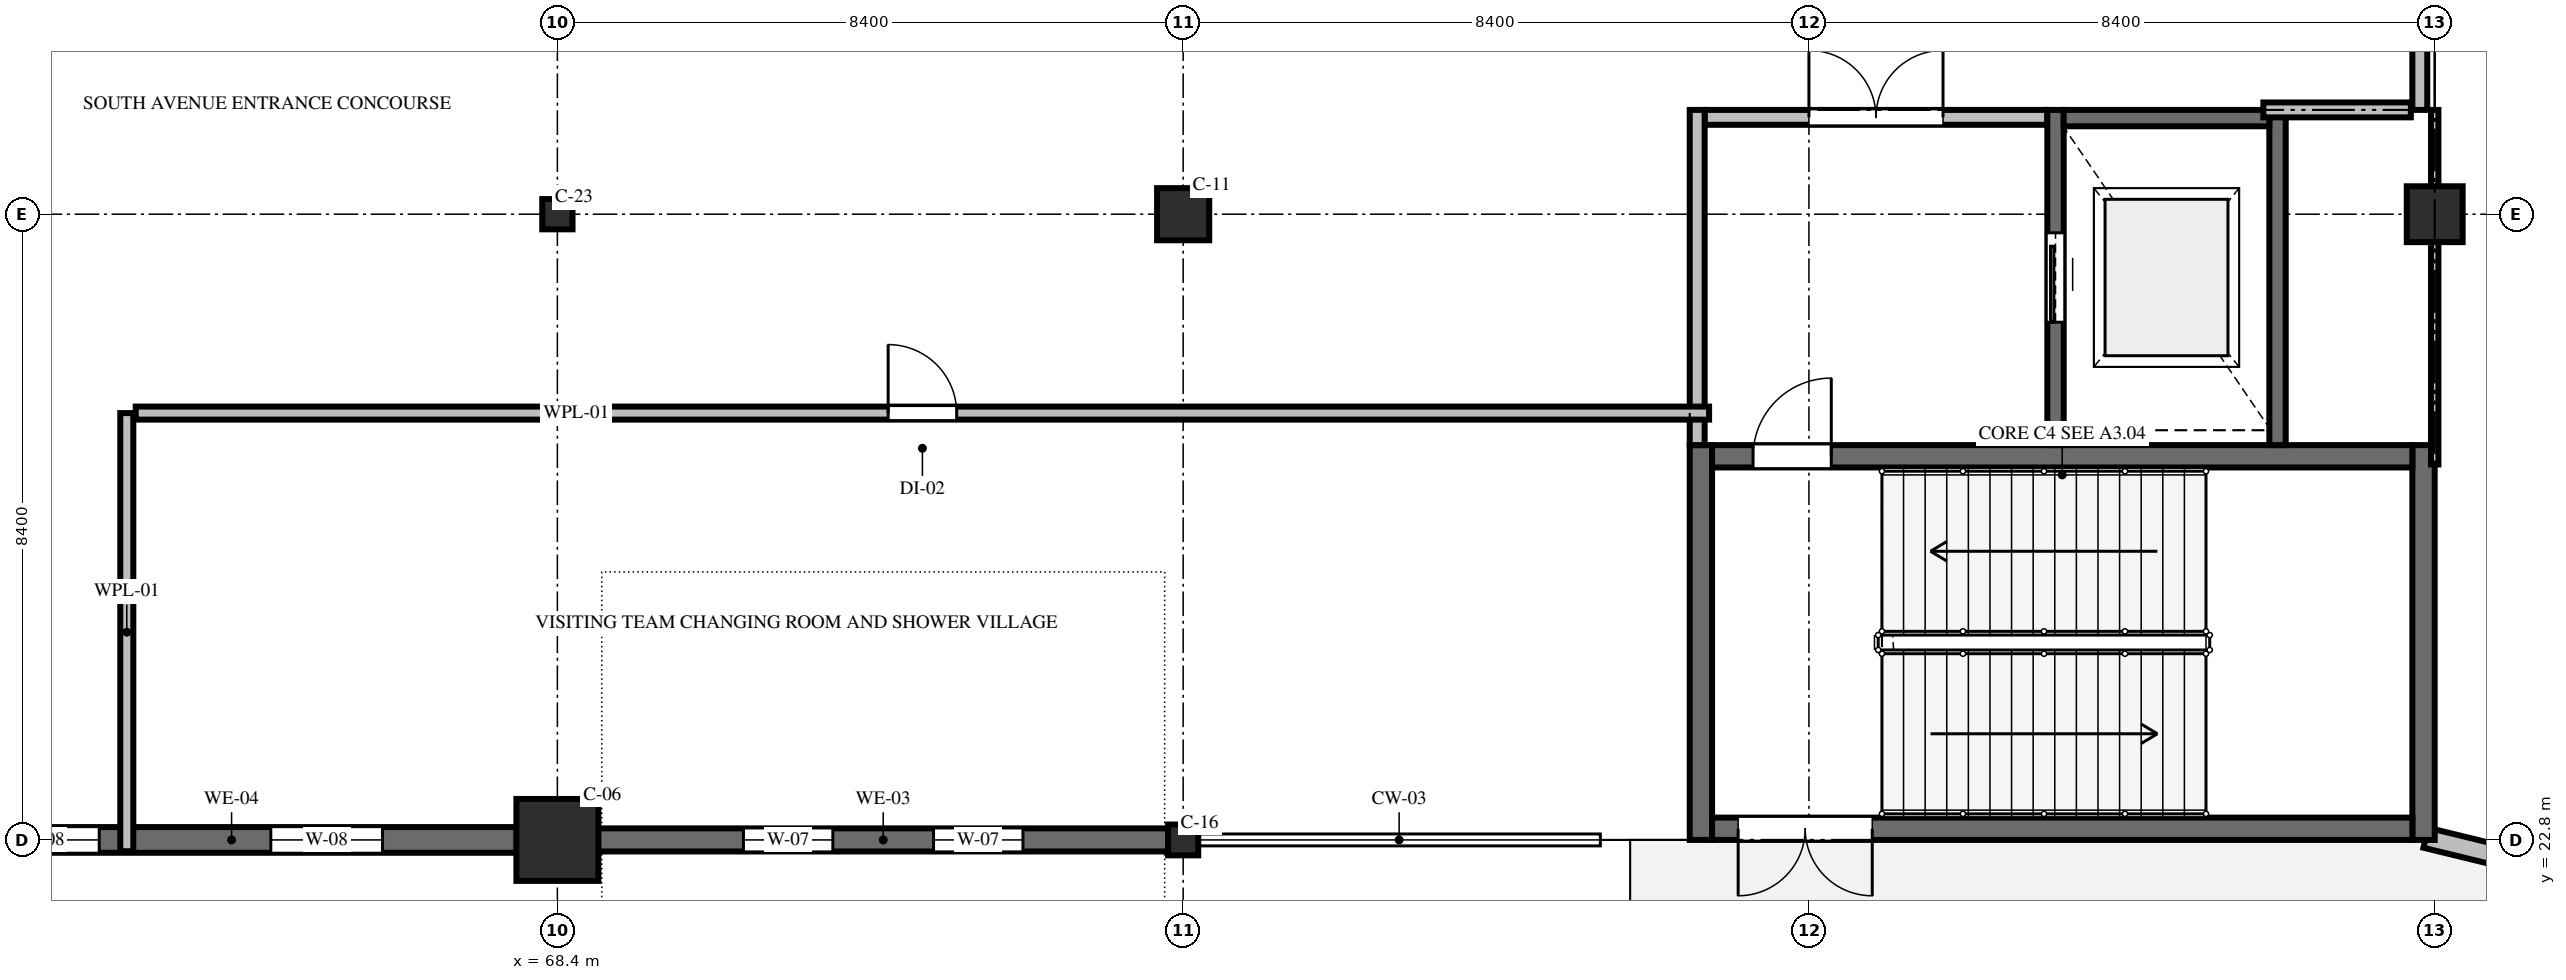
"""IFC4 building model, lengths in metres.
Left out: names, types, materials, properties, quantities, classifications, styles, units other than length and angle.
Written with IfcOpenShell. Run it as: python <this file> out.ifc"""

import sys

from ifc_helpers import new_model, si_unit, direction, frame, frame_2d, origin, origin_2d, place, context, subcontext, project, spatial, rectangle, circle, hollow_circle, i_section, extrude, element, fill, save


model = new_model("IFC4")
c1 = context("Model", 3, precision=1e-05, world=origin(), true_north=direction((0.0, 1.0)))
c2 = subcontext(c1, "Body", "Model", "MODEL_VIEW")
j1 = project(units=[si_unit("LENGTHUNIT", "METRE"), si_unit("PLANEANGLEUNIT", "RADIAN")], contexts=[c1])
p1 = place(None, origin())
s1 = spatial("IfcSite", under=j1, at=p1, CompositionType="ELEMENT")
p2 = place(p1, origin())
s2 = spatial("IfcBuilding", under=s1, at=p2, CompositionType="ELEMENT")
p3 = place(p2, origin())
s3 = spatial("IfcBuildingStorey", under=s2, at=p3, CompositionType="ELEMENT", Elevation=0.0)
p4 = place(p3, frame((68.4, 22.8, 0.0), z_axis=(0.0, 0.0, 1.0), x_axis=(1.0, 0.0, 0.0)))
e1 = element("IfcColumn", 1, at=p4, inside=s3, PredefinedType="COLUMN", context=c2, shape_type="SweptSolid", body=[
    extrude(rectangle(XDim=1.1, YDim=1.1, at=origin_2d()), origin(), (0.0, 0.0, 1.0), 5.4),
])
p5 = place(p3, frame((68.4, 31.2, 0.0), z_axis=(0.0, 0.0, 1.0), x_axis=(1.0, 0.0, 0.0)))
e2 = element("IfcColumn", 2, at=p5, inside=s3, PredefinedType="COLUMN", context=c2, shape_type="SweptSolid", body=[
    extrude(hollow_circle(Radius=0.203, WallThickness=0.016, at=origin_2d()), origin(), (0.0, 0.0, 1.0), 5.4),
])
p6 = place(p3, frame((76.8, 22.8, 0.0), z_axis=(0.0, 0.0, 1.0), x_axis=(1.0, 0.0, 0.0)))
e3 = element("IfcColumn", 3, at=p6, inside=s3, PredefinedType="COLUMN", context=c2, shape_type="SweptSolid", body=[
    extrude(i_section(OverallWidth=0.405, OverallDepth=0.414, WebThickness=0.018, FlangeThickness=0.028, FilletRadius=0.022, at=origin_2d()), origin(), (0.0, 0.0, 1.0), 5.4),
])
p7 = place(p3, frame((76.8, 31.2, 0.0), z_axis=(0.0, 0.0, 1.0), x_axis=(1.0, 0.0, 0.0)))
e4 = element("IfcColumn", 4, at=p7, inside=s3, PredefinedType="COLUMN", context=c2, shape_type="SweptSolid", body=[
    extrude(circle(Radius=0.35, at=origin_2d()), origin(), (0.0, 0.0, 1.0), 5.4),
])
p8 = place(p3, frame((93.6, 31.2, 0.0), z_axis=(0.0, 0.0, 1.0), x_axis=(1.0, 0.0, 0.0)))
e5 = element("IfcColumn", 5, at=p8, inside=s3, PredefinedType="COLUMN", context=c2, shape_type="SweptSolid", body=[
    extrude(rectangle(XDim=0.75, YDim=0.75, at=origin_2d()), origin(), (0.0, 0.0, 1.0), 5.4),
])
p9 = place(p3, frame((99.195, 21.435, 0.0), z_axis=(0.0, 0.0, 1.0), x_axis=(-0.971518473988, 0.236963825721, 0.0)))
e6 = element("IfcWall", 6, at=p9, inside=s3, PredefinedType="SOLIDWALL", context=c2, shape_type="SweptSolid", body=[
    extrude(rectangle(XDim=5.881, YDim=0.275, at=frame_2d((2.94, 0.0))), origin(), (0.0, 0.0, 1.0), 5.1),
])
p10 = place(p9, frame((2.465, 0.0, 0.0)))
e7 = element("IfcOpeningElement", 7, at=p10, cuts=e6, PredefinedType="OPENING", context=c2, shape_type="SweptSolid", body=[
    extrude(rectangle(XDim=0.95, YDim=2.15, at=frame_2d((0.475, 1.075))), frame((0.0, 0.147, 0.0), z_axis=(0.0, -1.0, 0.0), x_axis=(1.0, 0.0, 0.0)), (0.0, 0.0, 1.0), 0.295),
])
p11 = place(p3, frame((76.602, 22.8, 0.0), z_axis=(0.0, 0.0, 1.0), x_axis=(-1.0, 0.0, 0.0)))
e8 = element("IfcWall", 8, at=p11, inside=s3, PredefinedType="SOLIDWALL", context=c2, shape_type="SweptSolid", body=[
    extrude(rectangle(XDim=7.656, YDim=0.31, at=frame_2d((3.828, 0.0))), origin(), (0.0, 0.0, 1.0), 3.063),
])
p12 = place(p11, frame((1.952, 0.0, 0.9)))
e9 = element("IfcOpeningElement", 9, at=p12, cuts=e8, PredefinedType="OPENING", context=c2, shape_type="SweptSolid", body=[
    extrude(rectangle(XDim=1.2, YDim=1.5, at=frame_2d((0.6, 0.75))), frame((0.0, 0.165, 0.0), z_axis=(0.0, -1.0, 0.0), x_axis=(1.0, 0.0, 0.0)), (0.0, 0.0, 1.0), 0.33),
])
p13 = place(p11, frame((4.504, 0.0, 0.9)))
e10 = element("IfcOpeningElement", 10, at=p13, cuts=e8, PredefinedType="OPENING", context=c2, shape_type="SweptSolid", body=[
    extrude(rectangle(XDim=1.2, YDim=1.5, at=frame_2d((0.6, 0.75))), frame((0.0, 0.165, 0.0), z_axis=(0.0, -1.0, 0.0), x_axis=(1.0, 0.0, 0.0)), (0.0, 0.0, 1.0), 0.33),
])
p14 = place(p3, frame((67.854, 22.8, 0.0), z_axis=(0.0, 0.0, 1.0), x_axis=(-1.0, 0.0, 0.0)))
e11 = element("IfcWall", 11, at=p14, inside=s3, PredefinedType="SOLIDWALL", context=c2, shape_type="SweptSolid", body=[
    extrude(rectangle(XDim=7.655, YDim=0.345, at=frame_2d((3.827, 0.0))), origin(), (0.0, 0.0, 1.0), 3.063),
])
p15 = place(p14, frame((1.801, 0.0, 0.9)))
e12 = element("IfcOpeningElement", 12, at=p15, cuts=e11, PredefinedType="OPENING", context=c2, shape_type="SweptSolid", body=[
    extrude(rectangle(XDim=1.5, YDim=1.5, at=frame_2d((0.75, 0.75))), frame((0.0, 0.182, 0.0), z_axis=(0.0, -1.0, 0.0), x_axis=(1.0, 0.0, 0.0)), (0.0, 0.0, 1.0), 0.365),
])
p16 = place(p14, frame((5.604, 0.0, 0.9)))
e13 = element("IfcOpeningElement", 13, at=p16, cuts=e11, PredefinedType="OPENING", context=c2, shape_type="SweptSolid", body=[
    extrude(rectangle(XDim=1.5, YDim=1.5, at=frame_2d((0.75, 0.75))), frame((0.0, 0.182, 0.0), z_axis=(0.0, -1.0, 0.0), x_axis=(1.0, 0.0, 0.0)), (0.0, 0.0, 1.0), 0.365),
])
for number, where, z_axis, x_axis in (
    (14, (83.75, 22.8, 0.0), (0.0, 0.0, 1.0), (0.0, 1.0, 0.0)),
    (15, (93.45, 28.1, 0.0), (0.0, 0.0, 1.0), (0.0, -1.0, 0.0)),
):
    element("IfcWall", number, at=place(p3, frame(where, z_axis=z_axis, x_axis=x_axis)), inside=s3, PredefinedType="SHEAR", context=c2, shape_type="SweptSolid", body=[
        extrude(rectangle(XDim=5.3, YDim=0.3, at=frame_2d((2.65, 0.0))), origin(), (0.0, 0.0, 1.0), 5.17),
    ])
p17 = place(p3, frame((93.3, 22.95, 0.0), z_axis=(0.0, 0.0, 1.0), x_axis=(-1.0, 0.0, 0.0)))
e16 = element("IfcWall", 16, at=p17, inside=s3, PredefinedType="SHEAR", context=c2, shape_type="SweptSolid", body=[
    extrude(rectangle(XDim=9.4, YDim=0.3, at=frame_2d((4.7, 0.0))), origin(), (0.0, 0.0, 1.0), 5.17),
])
p18 = place(p17, frame((7.25, 0.0, 0.0)))
e17 = element("IfcOpeningElement", 17, at=p18, cuts=e16, PredefinedType="OPENING", context=c2, shape_type="SweptSolid", body=[
    extrude(rectangle(XDim=1.8, YDim=2.25, at=frame_2d((0.9, 1.125))), frame((0.0, 0.16, 0.0), z_axis=(0.0, -1.0, 0.0), x_axis=(1.0, 0.0, 0.0)), (0.0, 0.0, 1.0), 0.32),
])
p19 = place(p3, frame((83.9, 27.95, 0.0), z_axis=(0.0, 0.0, 1.0), x_axis=(1.0, 0.0, 0.0)))
e18 = element("IfcWall", 18, at=p19, inside=s3, PredefinedType="SHEAR", context=c2, shape_type="SweptSolid", body=[
    extrude(rectangle(XDim=9.4, YDim=0.3, at=frame_2d((4.7, 0.0))), origin(), (0.0, 0.0, 1.0), 5.17),
])
p20 = place(p19, frame((0.55, 0.0, 0.0)))
e19 = element("IfcOpeningElement", 19, at=p20, cuts=e18, PredefinedType="OPENING", context=c2, shape_type="SweptSolid", body=[
    extrude(rectangle(XDim=1.05, YDim=2.2, at=frame_2d((0.525, 1.1))), frame((0.0, 0.16, 0.0), z_axis=(0.0, -1.0, 0.0), x_axis=(1.0, 0.0, 0.0)), (0.0, 0.0, 1.0), 0.32),
])
p21 = place(p3, frame((83.8, 32.5, 0.0), z_axis=(0.0, 0.0, 1.0), x_axis=(1.0, 0.0, 0.0)))
e20 = element("IfcWall", 20, at=p21, inside=s3, PredefinedType="SOLIDWALL", context=c2, shape_type="SweptSolid", body=[
    extrude(rectangle(XDim=4.6, YDim=0.2, at=frame_2d((2.3, 0.0))), origin(), (0.0, 0.0, 1.0), 5.05),
])
p22 = place(p21, frame((1.4, 0.0, 0.0)))
e21 = element("IfcOpeningElement", 21, at=p22, cuts=e20, PredefinedType="OPENING", context=c2, shape_type="SweptSolid", body=[
    extrude(rectangle(XDim=1.8, YDim=2.2, at=frame_2d((0.9, 1.1))), frame((0.0, 0.11, 0.0), z_axis=(0.0, -1.0, 0.0), x_axis=(1.0, 0.0, 0.0)), (0.0, 0.0, 1.0), 0.22),
])
p23 = place(p3, frame((83.7, 28.1, 0.0), z_axis=(0.0, 0.0, 1.0), x_axis=(0.0, 1.0, 0.0)))
e22 = element("IfcWall", 22, at=p23, inside=s3, PredefinedType="SOLIDWALL", context=c2, shape_type="SweptSolid", body=[
    extrude(rectangle(XDim=4.5, YDim=0.2, at=frame_2d((2.25, 0.0))), origin(), (0.0, 0.0, 1.0), 5.05),
])
p24 = place(p3, frame((88.51, 28.1, 0.0), z_axis=(0.0, 0.0, 1.0), x_axis=(0.0, 1.0, 0.0)))
e23 = element("IfcWall", 23, at=p24, inside=s3, PredefinedType="SOLIDWALL", context=c2, shape_type="SweptSolid", body=[
    extrude(rectangle(XDim=4.5, YDim=0.22, at=frame_2d((2.25, 0.0))), origin(), (0.0, 0.0, 1.0), 5.17),
])
p25 = place(p24, frame((1.65, 0.0, 0.0)))
e24 = element("IfcOpeningElement", 24, at=p25, cuts=e23, PredefinedType="OPENING", context=c2, shape_type="SweptSolid", body=[
    extrude(rectangle(XDim=1.2, YDim=2.2, at=frame_2d((0.6, 1.1))), frame((0.0, 0.12, 0.0), z_axis=(0.0, -1.0, 0.0), x_axis=(1.0, 0.0, 0.0)), (0.0, 0.0, 1.0), 0.24),
])
p26 = place(p3, frame((91.49, 28.1, 0.0), z_axis=(0.0, 0.0, 1.0), x_axis=(0.0, 1.0, 0.0)))
e25 = element("IfcWall", 25, at=p26, inside=s3, PredefinedType="SOLIDWALL", context=c2, shape_type="SweptSolid", body=[
    extrude(rectangle(XDim=4.5, YDim=0.22, at=frame_2d((2.25, 0.0))), origin(), (0.0, 0.0, 1.0), 5.17),
])
p27 = place(p3, frame((88.62, 32.49, 0.0), z_axis=(0.0, 0.0, 1.0), x_axis=(1.0, 0.0, 0.0)))
e26 = element("IfcWall", 26, at=p27, inside=s3, PredefinedType="SOLIDWALL", context=c2, shape_type="SweptSolid", body=[
    extrude(rectangle(XDim=2.76, YDim=0.22, at=frame_2d((1.38, 0.0))), origin(), (0.0, 0.0, 1.0), 5.17),
])
p28 = place(p3, frame((93.4, 39.348, 0.0), z_axis=(0.0, 0.0, 1.0), x_axis=(0.0, -1.0, 0.0)))
e27 = element("IfcWall", 27, at=p28, inside=s3, PredefinedType="SOLIDWALL", context=c2, shape_type="SweptSolid", body=[
    extrude(rectangle(XDim=6.748, YDim=0.2, at=frame_2d((3.374, 0.0))), origin(), (0.0, 0.0, 1.0), 4.47),
])
p29 = place(p3, frame((93.28, 32.6, 0.0), z_axis=(0.0, 0.0, 1.0), x_axis=(-1.0, 0.0, 0.0)))
e28 = element("IfcWall", 28, at=p29, inside=s3, PredefinedType="SOLIDWALL", context=c2, shape_type="SweptSolid", body=[
    extrude(rectangle(XDim=1.98, YDim=0.2, at=frame_2d((0.99, 0.0))), origin(), (0.0, 0.0, 1.0), 5.05),
])
p30 = place(p3, frame((62.62, 22.648, 0.0), z_axis=(0.0, 0.0, 1.0), x_axis=(0.0, 1.0, 0.0)))
e29 = element("IfcWall", 29, at=p30, inside=s3, PredefinedType="PLUMBINGWALL", context=c2, shape_type="SweptSolid", body=[
    extrude(rectangle(XDim=5.882, YDim=0.175, at=frame_2d((2.941, 0.0))), origin(), (0.0, 0.0, 1.0), 3.065),
])
p31 = place(p3, frame((62.74, 28.53, 0.0), z_axis=(0.0, 0.0, 1.0), x_axis=(1.0, 0.0, 0.0)))
e30 = element("IfcWall", 30, at=p31, inside=s3, PredefinedType="PLUMBINGWALL", context=c2, shape_type="SweptSolid", body=[
    extrude(rectangle(XDim=21.12, YDim=0.175, at=frame_2d((10.56, 0.0))), origin(), (0.0, 0.0, 1.0), 4.27),
])
p32 = place(p31, frame((10.1, 0.0, 0.0)))
e31 = element("IfcOpeningElement", 31, at=p32, cuts=e30, PredefinedType="OPENING", context=c2, shape_type="SweptSolid", body=[
    extrude(rectangle(XDim=0.92, YDim=2.15, at=frame_2d((0.46, 1.075))), frame((0.0, 0.097, 0.0), z_axis=(0.0, -1.0, 0.0), x_axis=(1.0, 0.0, 0.0)), (0.0, 0.0, 1.0), 0.195),
])
p33 = place(p3, frame((93.6, 27.84, 0.0), z_axis=(0.0, 0.0, 1.0), x_axis=(0.0, 1.0, 0.0)))
e32 = element("IfcWall", 32, at=p33, inside=s3, PredefinedType="PARTITIONING", context=c2, shape_type="SweptSolid", body=[
    extrude(rectangle(XDim=4.76, YDim=0.1, at=frame_2d((2.38, 0.0))), origin(), (0.0, 0.0, 1.0), 4.47),
])
p34 = place(p12, origin())
e33 = element("IfcWindow", 33, at=p34, inside=s3, PartitioningType="DOUBLE_PANEL_VERTICAL", PredefinedType="WINDOW", context=c2, shape_type="SweptSolid", body=[
    extrude(rectangle(XDim=1.2, YDim=1.5, at=frame_2d((0.6, 0.75))), frame((0.0, 0.03, 0.0), z_axis=(0.0, -1.0, 0.0), x_axis=(1.0, 0.0, 0.0)), (0.0, 0.0, 1.0), 0.06),
])
fill(e9, e33)
p35 = place(p13, origin())
e34 = element("IfcWindow", 34, at=p35, inside=s3, PartitioningType="DOUBLE_PANEL_VERTICAL", PredefinedType="WINDOW", context=c2, shape_type="SweptSolid", body=[
    extrude(rectangle(XDim=1.2, YDim=1.5, at=frame_2d((0.6, 0.75))), frame((0.0, 0.03, 0.0), z_axis=(0.0, -1.0, 0.0), x_axis=(1.0, 0.0, 0.0)), (0.0, 0.0, 1.0), 0.06),
])
fill(e10, e34)
p36 = place(p15, origin())
e35 = element("IfcWindow", 35, at=p36, inside=s3, PartitioningType="DOUBLE_PANEL_VERTICAL", PredefinedType="WINDOW", context=c2, shape_type="SweptSolid", body=[
    extrude(rectangle(XDim=1.5, YDim=1.5, at=frame_2d((0.75, 0.75))), frame((0.0, 0.03, 0.0), z_axis=(0.0, -1.0, 0.0), x_axis=(1.0, 0.0, 0.0)), (0.0, 0.0, 1.0), 0.06),
])
fill(e12, e35)
p37 = place(p16, origin())
e36 = element("IfcWindow", 36, at=p37, inside=s3, PartitioningType="DOUBLE_PANEL_VERTICAL", PredefinedType="WINDOW", context=c2, shape_type="SweptSolid", body=[
    extrude(rectangle(XDim=1.5, YDim=1.5, at=frame_2d((0.75, 0.75))), frame((0.0, 0.03, 0.0), z_axis=(0.0, -1.0, 0.0), x_axis=(1.0, 0.0, 0.0)), (0.0, 0.0, 1.0), 0.06),
])
fill(e13, e36)
p38 = place(p18, origin())
e37 = element("IfcDoor", 37, at=p38, inside=s3, OperationType="DOUBLE_DOOR_SINGLE_SWING", PredefinedType="DOOR", context=c2, shape_type="SweptSolid", body=[
    extrude(rectangle(XDim=1.8, YDim=2.25, at=frame_2d((0.9, 1.125))), frame((0.0, 0.025, 0.0), z_axis=(0.0, -1.0, 0.0), x_axis=(1.0, 0.0, 0.0)), (0.0, 0.0, 1.0), 0.05),
])
fill(e17, e37)
p39 = place(p20, origin())
e38 = element("IfcDoor", 38, at=p39, inside=s3, OperationType="SINGLE_SWING_RIGHT", PredefinedType="DOOR", context=c2, shape_type="SweptSolid", body=[
    extrude(rectangle(XDim=1.05, YDim=2.2, at=frame_2d((0.525, 1.1))), frame((0.0, 0.025, 0.0), z_axis=(0.0, -1.0, 0.0), x_axis=(1.0, 0.0, 0.0)), (0.0, 0.0, 1.0), 0.05),
])
fill(e19, e38)
p40 = place(p22, origin())
e39 = element("IfcDoor", 39, at=p40, inside=s3, OperationType="DOUBLE_DOOR_SINGLE_SWING", PredefinedType="DOOR", context=c2, shape_type="SweptSolid", body=[
    extrude(rectangle(XDim=1.8, YDim=2.2, at=frame_2d((0.9, 1.1))), frame((0.0, 0.025, 0.0), z_axis=(0.0, -1.0, 0.0), x_axis=(1.0, 0.0, 0.0)), (0.0, 0.0, 1.0), 0.05),
])
fill(e21, e39)
p41 = place(p25, origin())
e40 = element("IfcDoor", 40, at=p41, inside=s3, OperationType="SLIDING_TO_LEFT", PredefinedType="DOOR", context=c2, shape_type="SweptSolid", body=[
    extrude(rectangle(XDim=1.2, YDim=2.2, at=frame_2d((0.6, 1.1))), frame((0.0, 0.025, 0.0), z_axis=(0.0, -1.0, 0.0), x_axis=(1.0, 0.0, 0.0)), (0.0, 0.0, 1.0), 0.05),
])
fill(e24, e40)
p42 = place(p32, origin())
e41 = element("IfcDoor", 41, at=p42, inside=s3, OperationType="SINGLE_SWING_LEFT", PredefinedType="DOOR", context=c2, shape_type="SweptSolid", body=[
    extrude(rectangle(XDim=0.92, YDim=2.15, at=frame_2d((0.46, 1.075))), frame((0.0, 0.025, 0.0), z_axis=(0.0, -1.0, 0.0), x_axis=(1.0, 0.0, 0.0)), (0.0, 0.0, 1.0), 0.05),
])
fill(e31, e41)
save(model, sys.argv[1])
